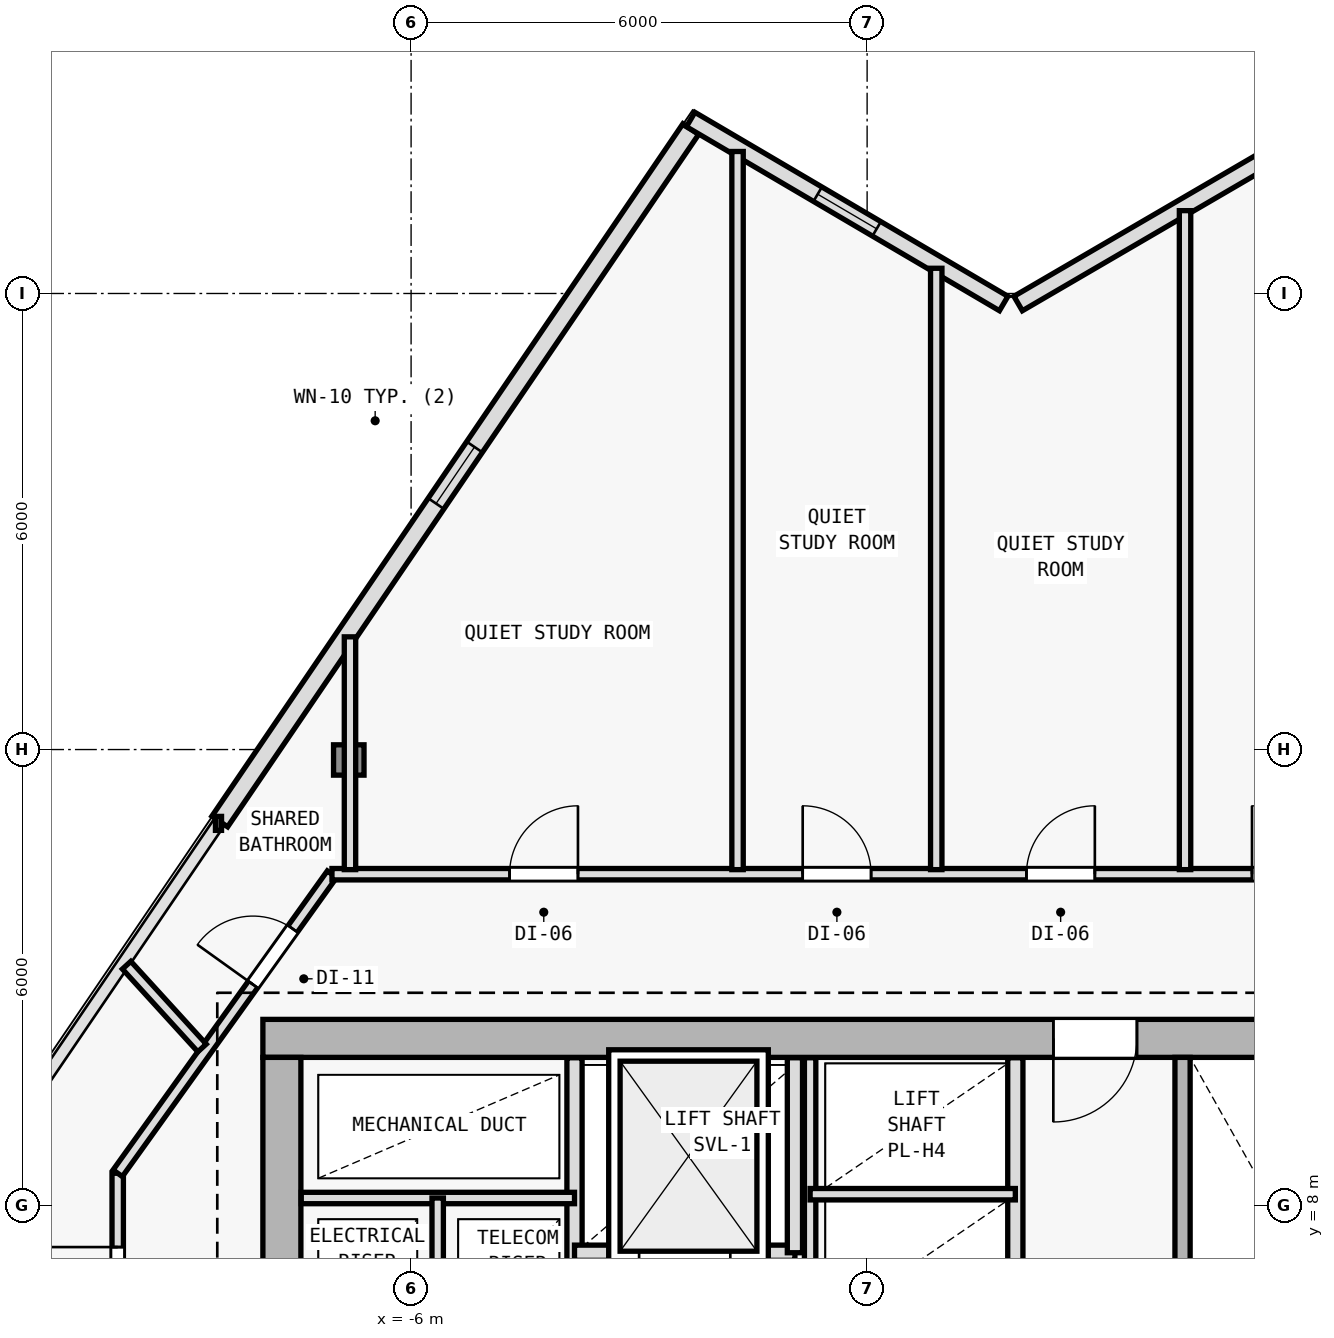
"""IFC4 building model, lengths in metres.
Left out: names, types, materials, properties, quantities, classifications, styles, units other than length and angle.
Written with IfcOpenShell. Run it as: python <this file> out.ifc"""

import sys

from ifc_helpers import new_model, si_unit, direction, frame, frame_2d, origin, origin_2d, place, context, subcontext, project, spatial, rectangle, i_section, extrude, element, fill, save


model = new_model("IFC4")
c1 = context("Model", 3, precision=1e-05, world=origin(), true_north=direction((0.0, 1.0)))
c2 = subcontext(c1, "Body", "Model", "MODEL_VIEW")
j1 = project(units=[si_unit("LENGTHUNIT", "METRE"), si_unit("PLANEANGLEUNIT", "RADIAN")], contexts=[c1])
p1 = place(None, origin())
s1 = spatial("IfcSite", under=j1, at=p1, CompositionType="ELEMENT")
p2 = place(p1, origin())
s2 = spatial("IfcBuilding", under=s1, at=p2, CompositionType="ELEMENT")
p3 = place(p2, frame((0.0, 0.0, 163.8)))
s3 = spatial("IfcBuildingStorey", under=s2, at=p3, CompositionType="ELEMENT", Elevation=163.8)
p4 = place(p3, frame((-7.7, 10.2, 0.0), z_axis=(0.0, 0.0, 1.0), x_axis=(1.0, 0.0, 0.0)))
e1 = element("IfcColumn", 1, at=p4, inside=s3, PredefinedType="COLUMN", context=c2, shape_type="SweptSolid", body=[
    extrude(i_section(OverallWidth=0.404, OverallDepth=0.407, WebThickness=0.017, FlangeThickness=0.028, FilletRadius=0.015, at=origin_2d()), origin(), (0.0, 0.0, 1.0), 3.6),
])
p5 = place(p3, frame((-6.82, 13.863, 0.005), z_axis=(0.008842562123, -0.00251672922, 0.999957736691), x_axis=(0.273743828055, 0.961802639112, 0.0)))
e2 = element("IfcColumn", 2, at=p5, inside=s3, PredefinedType="COLUMN", context=c2, shape_type="SweptSolid", body=[
    extrude(i_section(OverallWidth=0.401, OverallDepth=0.399, WebThickness=0.016, FlangeThickness=0.025, FilletRadius=0.015, at=origin_2d()), origin(), (0.0, 0.0, 1.0), 3.589),
])
p6 = place(p3, frame((-8.517, 13.053, 0.0), z_axis=(0.0, 0.0, 1.0), x_axis=(0.562463961516, 0.826821801838, 0.0)))
e3 = element("IfcWall", 3, at=p6, inside=s3, PredefinedType="SOLIDWALL", context=c2, shape_type="SweptSolid", body=[
    extrude(rectangle(XDim=11.018, YDim=0.25, at=frame_2d((5.509, 0.0))), origin(), (0.0, 0.0, 1.0), 3.35),
])
p7 = place(p6, frame((5.059, 0.0, 0.62)))
e4 = element("IfcOpeningElement", 4, at=p7, cuts=e3, PredefinedType="OPENING", context=c2, shape_type="SweptSolid", body=[
    extrude(rectangle(XDim=0.9, YDim=1.6, at=frame_2d((0.45, 0.8))), frame((0.0, 0.135, 0.0), z_axis=(0.0, -1.0, 0.0), x_axis=(1.0, 0.0, 0.0)), (0.0, 0.0, 1.0), 0.27),
])
p8 = place(p3, frame((1.987, 19.868, 0.0), z_axis=(0.0, 0.0, 1.0), x_axis=(0.863979520686, 0.503526948469, 0.0)))
e5 = element("IfcWall", 5, at=p8, inside=s3, PredefinedType="SOLIDWALL", context=c2, shape_type="SweptSolid", body=[
    extrude(rectangle(XDim=4.324, YDim=0.22, at=frame_2d((2.162, 0.0))), origin(), (0.0, 0.0, 1.0), 3.35),
])
p9 = place(p3, frame((-2.322, 22.289, 0.0), z_axis=(0.0, 0.0, 1.0), x_axis=(0.862111523483, -0.506718581738, 0.0)))
e6 = element("IfcWall", 6, at=p9, inside=s3, PredefinedType="SOLIDWALL", context=c2, shape_type="SweptSolid", body=[
    extrude(rectangle(XDim=4.777, YDim=0.22, at=frame_2d((2.389, 0.0))), origin(), (0.0, 0.0, 1.0), 3.35),
])
p10 = place(p9, frame((1.939, 0.0, 0.62)))
e7 = element("IfcOpeningElement", 7, at=p10, cuts=e6, PredefinedType="OPENING", context=c2, shape_type="SweptSolid", body=[
    extrude(rectangle(XDim=0.9, YDim=1.6, at=frame_2d((0.45, 0.8))), frame((0.0, 0.12, 0.0), z_axis=(0.0, -1.0, 0.0), x_axis=(1.0, 0.0, 0.0)), (0.0, 0.0, 1.0), 0.24),
])
p11 = place(p3, frame((7.95, 10.2, 0.0), z_axis=(0.0, 0.0, 1.0), x_axis=(-1.0, 0.0, 0.0)))
e8 = element("IfcWall", 8, at=p11, inside=s3, PredefinedType="SHEAR", context=c2, shape_type="SweptSolid", body=[
    extrude(rectangle(XDim=15.9, YDim=0.5, at=frame_2d((7.95, 0.0))), origin(), (0.0, 0.0, 1.0), 3.35),
])
p12 = place(p11, frame((4.4, 0.0, 0.0)))
e9 = element("IfcOpeningElement", 9, at=p12, cuts=e8, PredefinedType="OPENING", context=c2, shape_type="SweptSolid", body=[
    extrude(rectangle(XDim=1.1, YDim=2.15, at=frame_2d((0.55, 1.075))), frame((0.0, 0.26, 0.0), z_axis=(0.0, -1.0, 0.0), x_axis=(1.0, 0.0, 0.0)), (0.0, 0.0, 1.0), 0.52),
])
p13 = place(p3, frame((-7.7, -9.15, 0.0), z_axis=(0.0, 0.0, 1.0), x_axis=(0.0, 1.0, 0.0)))
e10 = element("IfcWall", 10, at=p13, inside=s3, PredefinedType="SHEAR", context=c2, shape_type="SweptSolid", body=[
    extrude(rectangle(XDim=19.1, YDim=0.5, at=frame_2d((9.55, 0.0))), origin(), (0.0, 0.0, 1.0), 3.35),
])
p14 = place(p13, frame((12.7, 0.0, 0.0)))
e11 = element("IfcOpeningElement", 11, at=p14, cuts=e10, PredefinedType="OPENING", context=c2, shape_type="SweptSolid", body=[
    extrude(rectangle(XDim=1.1, YDim=2.15, at=frame_2d((0.55, 1.075))), frame((0.0, 0.26, 0.0), z_axis=(0.0, -1.0, 0.0), x_axis=(1.0, 0.0, 0.0)), (0.0, 0.0, 1.0), 0.52),
])
p15 = place(p3, frame((-3.85, 1.35, 0.0), z_axis=(0.0, 0.0, 1.0), x_axis=(0.0, 1.0, 0.0)))
e12 = element("IfcWall", 12, at=p15, inside=s3, PredefinedType="SOLIDWALL", context=c2, shape_type="SweptSolid", body=[
    extrude(rectangle(XDim=8.595, YDim=0.2, at=frame_2d((4.297, 0.0))), origin(), (0.0, 0.0, 1.0), 3.35),
])
p16 = place(p15, frame((1.5, 0.0, 0.0)))
e13 = element("IfcOpeningElement", 13, at=p16, cuts=e12, PredefinedType="OPENING", context=c2, shape_type="SweptSolid", body=[
    extrude(rectangle(XDim=1.0, YDim=2.15, at=frame_2d((0.5, 1.075))), frame((0.0, 0.11, 0.0), z_axis=(0.0, -1.0, 0.0), x_axis=(1.0, 0.0, 0.0)), (0.0, 0.0, 1.0), 0.22),
])
p17 = place(p15, frame((3.18, 0.0, 0.0)))
e14 = element("IfcOpeningElement", 14, at=p17, cuts=e12, PredefinedType="OPENING", context=c2, shape_type="SweptSolid", body=[
    extrude(rectangle(XDim=1.0, YDim=2.15, at=frame_2d((0.5, 1.075))), frame((0.0, 0.11, 0.0), z_axis=(0.0, -1.0, 0.0), x_axis=(1.0, 0.0, 0.0)), (0.0, 0.0, 1.0), 0.22),
])
p18 = place(p3, frame((-7.445, 8.1, 0.0), z_axis=(0.0, 0.0, 1.0), x_axis=(1.0, 0.0, 0.0)))
e15 = element("IfcWall", 15, at=p18, inside=s3, PredefinedType="PARTITIONING", context=c2, shape_type="SweptSolid", body=[
    extrude(rectangle(XDim=3.595, YDim=0.15, at=frame_2d((1.797, 0.0))), origin(), (0.0, 0.0, 1.0), 3.35),
])
p19 = place(p3, frame((-5.65, 6.05, 0.0), z_axis=(0.0, 0.0, 1.0), x_axis=(0.0, 1.0, 0.0)))
e16 = element("IfcWall", 16, at=p19, inside=s3, PredefinedType="PARTITIONING", context=c2, shape_type="SweptSolid", body=[
    extrude(rectangle(XDim=2.05, YDim=0.15, at=frame_2d((1.025, 0.0))), origin(), (0.0, 0.0, 1.0), 3.35),
])
p20 = place(p3, frame((4.15, 2.75, 0.0), z_axis=(0.0, 0.0, 1.0), x_axis=(0.0, 1.0, 0.0)))
e17 = element("IfcWall", 17, at=p20, inside=s3, PredefinedType="SOLIDWALL", context=c2, shape_type="SweptSolid", body=[
    extrude(rectangle(XDim=7.2, YDim=0.2, at=frame_2d((3.6, 0.0))), origin(), (0.0, 0.0, 1.0), 3.35),
])
p21 = place(p20, frame((0.35, 0.0, 0.0)))
e18 = element("IfcOpeningElement", 18, at=p21, cuts=e17, PredefinedType="OPENING", context=c2, shape_type="SweptSolid", body=[
    extrude(rectangle(XDim=1.0, YDim=2.15, at=frame_2d((0.5, 1.075))), frame((0.0, 0.11, 0.0), z_axis=(0.0, -1.0, 0.0), x_axis=(1.0, 0.0, 0.0)), (0.0, 0.0, 1.0), 0.22),
])
p22 = place(p3, frame((-3.85, 7.38, 0.0), z_axis=(0.0, 0.0, 1.0), x_axis=(1.0, 0.0, 0.0)))
e19 = element("IfcWall", 19, at=p22, inside=s3, PredefinedType="SOLIDWALL", context=c2, shape_type="SweptSolid", body=[
    extrude(rectangle(XDim=2.9, YDim=0.2, at=frame_2d((1.45, 0.0))), origin(), (0.0, 0.0, 1.0), 3.35),
])
p23 = place(p22, frame((0.85, 0.0, 0.0)))
e20 = element("IfcOpeningElement", 20, at=p23, cuts=e19, PredefinedType="OPENING", context=c2, shape_type="SweptSolid", body=[
    extrude(rectangle(XDim=1.2, YDim=2.2, at=frame_2d((0.6, 1.1))), frame((0.0, 0.11, 0.0), z_axis=(0.0, -1.0, 0.0), x_axis=(1.0, 0.0, 0.0)), (0.0, 0.0, 1.0), 0.22),
])
p24 = place(p3, frame((-0.95, 7.38, 0.0), z_axis=(0.0, 0.0, 1.0), x_axis=(0.0, 1.0, 0.0)))
e21 = element("IfcWall", 21, at=p24, inside=s3, PredefinedType="SOLIDWALL", context=c2, shape_type="SweptSolid", body=[
    extrude(rectangle(XDim=2.565, YDim=0.2, at=frame_2d((1.283, 0.0))), origin(), (0.0, 0.0, 1.0), 3.35),
])
p25 = place(p3, frame((1.95, 2.65, 0.0), z_axis=(0.0, 0.0, 1.0), x_axis=(0.0, 1.0, 0.0)))
e22 = element("IfcWall", 22, at=p25, inside=s3, PredefinedType="SOLIDWALL", context=c2, shape_type="SweptSolid", body=[
    extrude(rectangle(XDim=7.295, YDim=0.2, at=frame_2d((3.647, 0.0))), origin(), (0.0, 0.0, 1.0), 3.35),
])
p26 = place(p3, frame((-0.75, 5.92, 0.0), z_axis=(0.0, 0.0, 1.0), x_axis=(0.0, 1.0, 0.0)))
e23 = element("IfcWall", 23, at=p26, inside=s3, PredefinedType="PARTITIONING", context=c2, shape_type="SweptSolid", body=[
    extrude(rectangle(XDim=4.025, YDim=0.15, at=frame_2d((2.013, 0.0))), origin(), (0.0, 0.0, 1.0), 3.35),
])
p27 = place(p3, frame((-0.75, 8.15, 0.0), z_axis=(0.0, 0.0, 1.0), x_axis=(1.0, 0.0, 0.0)))
e24 = element("IfcWall", 24, at=p27, inside=s3, PredefinedType="PARTITIONING", context=c2, shape_type="SweptSolid", body=[
    extrude(rectangle(XDim=2.7, YDim=0.15, at=frame_2d((1.35, 0.0))), origin(), (0.0, 0.0, 1.0), 3.35),
])
p28 = place(p3, frame((-9.86, -11.56, 0.0), z_axis=(0.0, 0.0, 1.0), x_axis=(0.0, 1.0, 0.0)))
e25 = element("IfcWall", 25, at=p28, inside=s3, PredefinedType="PARTITIONING", context=c2, shape_type="SweptSolid", body=[
    extrude(rectangle(XDim=19.986, YDim=0.15, at=frame_2d((9.993, 0.0))), origin(), (0.0, 0.0, 1.0), 2.725),
])
p29 = place(p28, frame((10.717, 0.0, 0.0)))
e26 = element("IfcOpeningElement", 26, at=p29, cuts=e25, PredefinedType="OPENING", context=c2, shape_type="SweptSolid", body=[
    extrude(rectangle(XDim=0.9, YDim=2.1, at=frame_2d((0.45, 1.05))), frame((0.0, 0.085, 0.0), z_axis=(0.0, -1.0, 0.0), x_axis=(1.0, 0.0, 0.0)), (0.0, 0.0, 1.0), 0.17),
])
p30 = place(p28, frame((8.333, 0.0, 0.0)))
e27 = element("IfcOpeningElement", 27, at=p30, cuts=e25, PredefinedType="OPENING", context=c2, shape_type="SweptSolid", body=[
    extrude(rectangle(XDim=0.9, YDim=2.1, at=frame_2d((0.45, 1.05))), frame((0.0, 0.085, 0.0), z_axis=(0.0, -1.0, 0.0), x_axis=(1.0, 0.0, 0.0)), (0.0, 0.0, 1.0), 0.17),
])
p31 = place(p28, frame((5.612, 0.0, 0.0)))
e28 = element("IfcOpeningElement", 28, at=p31, cuts=e25, PredefinedType="OPENING", context=c2, shape_type="SweptSolid", body=[
    extrude(rectangle(XDim=0.9, YDim=2.1, at=frame_2d((0.45, 1.05))), frame((0.0, 0.085, 0.0), z_axis=(0.0, -1.0, 0.0), x_axis=(1.0, 0.0, 0.0)), (0.0, 0.0, 1.0), 0.17),
])
p32 = place(p28, frame((1.932, 0.0, 0.0)))
e29 = element("IfcOpeningElement", 29, at=p32, cuts=e25, PredefinedType="OPENING", context=c2, shape_type="SweptSolid", body=[
    extrude(rectangle(XDim=0.9, YDim=2.1, at=frame_2d((0.45, 1.05))), frame((0.0, 0.085, 0.0), z_axis=(0.0, -1.0, 0.0), x_axis=(1.0, 0.0, 0.0)), (0.0, 0.0, 1.0), 0.17),
])
p33 = place(p28, frame((18.115, 0.0, 0.0)))
e30 = element("IfcOpeningElement", 30, at=p33, cuts=e25, PredefinedType="OPENING", context=c2, shape_type="SweptSolid", body=[
    extrude(rectangle(XDim=0.9, YDim=2.1, at=frame_2d((0.45, 1.05))), frame((0.0, 0.085, 0.0), z_axis=(0.0, -1.0, 0.0), x_axis=(1.0, 0.0, 0.0)), (0.0, 0.0, 1.0), 0.17),
])
p34 = place(p28, frame((15.711, 0.0, 0.0)))
e31 = element("IfcOpeningElement", 31, at=p34, cuts=e25, PredefinedType="OPENING", context=c2, shape_type="SweptSolid", body=[
    extrude(rectangle(XDim=0.9, YDim=2.1, at=frame_2d((0.45, 1.05))), frame((0.0, 0.085, 0.0), z_axis=(0.0, -1.0, 0.0), x_axis=(1.0, 0.0, 0.0)), (0.0, 0.0, 1.0), 0.17),
])
p35 = place(p28, frame((13.205, 0.0, 0.0)))
e32 = element("IfcOpeningElement", 32, at=p35, cuts=e25, PredefinedType="OPENING", context=c2, shape_type="SweptSolid", body=[
    extrude(rectangle(XDim=0.9, YDim=2.1, at=frame_2d((0.45, 1.05))), frame((0.0, 0.085, 0.0), z_axis=(0.0, -1.0, 0.0), x_axis=(1.0, 0.0, 0.0)), (0.0, 0.0, 1.0), 0.17),
])
p36 = place(p3, frame((-9.86, 8.426, 0.0), z_axis=(0.0, 0.0, 1.0), x_axis=(0.582449511476, 0.812866881218, 0.0)))
e33 = element("IfcWall", 33, at=p36, inside=s3, PredefinedType="PARTITIONING", context=c2, shape_type="SweptSolid", body=[
    extrude(rectangle(XDim=4.84, YDim=0.15, at=frame_2d((2.42, 0.0))), origin(), (0.0, 0.0, 1.0), 2.965),
])
p37 = place(p36, frame((3.055, 0.0, 0.0)))
e34 = element("IfcOpeningElement", 34, at=p37, cuts=e33, PredefinedType="OPENING", context=c2, shape_type="SweptSolid", body=[
    extrude(rectangle(XDim=0.9, YDim=2.1, at=frame_2d((0.45, 1.05))), frame((0.0, 0.085, 0.0), z_axis=(0.0, -1.0, 0.0), x_axis=(1.0, 0.0, 0.0)), (0.0, 0.0, 1.0), 0.17),
])
p38 = place(p3, frame((-7.041, 12.36, 0.0), z_axis=(0.0, 0.0, 1.0), x_axis=(1.0, 0.0, 0.0)))
e35 = element("IfcWall", 35, at=p38, inside=s3, PredefinedType="PARTITIONING", context=c2, shape_type="SweptSolid", body=[
    extrude(rectangle(XDim=14.064, YDim=0.15, at=frame_2d((7.032, 0.0))), origin(), (0.0, 0.0, 1.0), 2.965),
])
p39 = place(p38, frame((12.105, 0.0, 0.0)))
e36 = element("IfcOpeningElement", 36, at=p39, cuts=e35, PredefinedType="OPENING", context=c2, shape_type="SweptSolid", body=[
    extrude(rectangle(XDim=0.9, YDim=2.1, at=frame_2d((0.45, 1.05))), frame((0.0, 0.085, 0.0), z_axis=(0.0, -1.0, 0.0), x_axis=(1.0, 0.0, 0.0)), (0.0, 0.0, 1.0), 0.17),
])
p40 = place(p38, frame((9.137, 0.0, 0.0)))
e37 = element("IfcOpeningElement", 37, at=p40, cuts=e35, PredefinedType="OPENING", context=c2, shape_type="SweptSolid", body=[
    extrude(rectangle(XDim=0.9, YDim=2.1, at=frame_2d((0.45, 1.05))), frame((0.0, 0.085, 0.0), z_axis=(0.0, -1.0, 0.0), x_axis=(1.0, 0.0, 0.0)), (0.0, 0.0, 1.0), 0.17),
])
p41 = place(p38, frame((6.193, 0.0, 0.0)))
e38 = element("IfcOpeningElement", 38, at=p41, cuts=e35, PredefinedType="OPENING", context=c2, shape_type="SweptSolid", body=[
    extrude(rectangle(XDim=0.9, YDim=2.1, at=frame_2d((0.45, 1.05))), frame((0.0, 0.085, 0.0), z_axis=(0.0, -1.0, 0.0), x_axis=(1.0, 0.0, 0.0)), (0.0, 0.0, 1.0), 0.17),
])
p42 = place(p38, frame((2.337, 0.0, 0.0)))
e39 = element("IfcOpeningElement", 39, at=p42, cuts=e35, PredefinedType="OPENING", context=c2, shape_type="SweptSolid", body=[
    extrude(rectangle(XDim=0.9, YDim=2.1, at=frame_2d((0.45, 1.05))), frame((0.0, 0.085, 0.0), z_axis=(0.0, -1.0, 0.0), x_axis=(1.0, 0.0, 0.0)), (0.0, 0.0, 1.0), 0.17),
])
p43 = place(p3, frame((-6.804, 12.42, 0.0), z_axis=(0.0, 0.0, 1.0), x_axis=(0.0, 1.0, 0.0)))
e40 = element("IfcWall", 40, at=p43, inside=s3, PredefinedType="PARTITIONING", context=c2, shape_type="SweptSolid", body=[
    extrude(rectangle(XDim=3.063, YDim=0.15, at=frame_2d((1.531, 0.0))), origin(), (0.0, 0.0, 1.0), 2.935),
])
p44 = place(p3, frame((0.909, 12.42, 0.0), z_axis=(0.0, 0.0, 1.0), x_axis=(0.0, 1.0, 0.0)))
e41 = element("IfcWall", 41, at=p44, inside=s3, PredefinedType="PARTITIONING", context=c2, shape_type="SweptSolid", body=[
    extrude(rectangle(XDim=7.912, YDim=0.15, at=frame_2d((3.956, 0.0))), origin(), (0.0, 0.0, 1.0), 2.935),
])
p45 = place(p3, frame((-8.75, 10.074, 0.0), z_axis=(0.0, 0.0, 1.0), x_axis=(-0.673703282985, 0.739001952971, 0.0)))
e42 = element("IfcWall", 42, at=p45, inside=s3, PredefinedType="PARTITIONING", context=c2, shape_type="SweptSolid", body=[
    extrude(rectangle(XDim=1.473, YDim=0.15, at=frame_2d((0.737, 0.0))), origin(), (0.0, 0.0, 1.0), 2.935),
])
p46 = place(p3, frame((4.183, 12.42, 0.0), z_axis=(0.0, 0.0, 1.0), x_axis=(0.0, 1.0, 0.0)))
e43 = element("IfcWall", 43, at=p46, inside=s3, PredefinedType="PARTITIONING", context=c2, shape_type="SweptSolid", body=[
    extrude(rectangle(XDim=8.67, YDim=0.15, at=frame_2d((4.335, 0.0))), origin(), (0.0, 0.0, 1.0), 2.935),
])
p47 = place(p3, frame((-1.705, 12.42, 0.0), z_axis=(0.0, 0.0, 1.0), x_axis=(0.0, 1.0, 0.0)))
e44 = element("IfcWall", 44, at=p47, inside=s3, PredefinedType="PARTITIONING", context=c2, shape_type="SweptSolid", body=[
    extrude(rectangle(XDim=9.448, YDim=0.15, at=frame_2d((4.724, 0.0))), origin(), (0.0, 0.0, 1.0), 2.935),
])
p48 = place(p7, origin())
e45 = element("IfcWindow", 45, at=p48, inside=s3, PartitioningType="SINGLE_PANEL", PredefinedType="WINDOW", context=c2, shape_type="SweptSolid", body=[
    extrude(rectangle(XDim=0.9, YDim=1.6, at=frame_2d((0.45, 0.8))), frame((0.0, 0.03, 0.0), z_axis=(0.0, -1.0, 0.0), x_axis=(1.0, 0.0, 0.0)), (0.0, 0.0, 1.0), 0.06),
])
fill(e4, e45)
p49 = place(p10, origin())
e46 = element("IfcWindow", 46, at=p49, inside=s3, PartitioningType="SINGLE_PANEL", PredefinedType="WINDOW", context=c2, shape_type="SweptSolid", body=[
    extrude(rectangle(XDim=0.9, YDim=1.6, at=frame_2d((0.45, 0.8))), frame((0.0, 0.03, 0.0), z_axis=(0.0, -1.0, 0.0), x_axis=(1.0, 0.0, 0.0)), (0.0, 0.0, 1.0), 0.06),
])
fill(e7, e46)
p50 = place(p12, origin())
e47 = element("IfcDoor", 47, at=p50, inside=s3, OperationType="SINGLE_SWING_RIGHT", PredefinedType="DOOR", context=c2, shape_type="SweptSolid", body=[
    extrude(rectangle(XDim=1.1, YDim=2.15, at=frame_2d((0.55, 1.075))), frame((0.0, 0.025, 0.0), z_axis=(0.0, -1.0, 0.0), x_axis=(1.0, 0.0, 0.0)), (0.0, 0.0, 1.0), 0.05),
])
fill(e9, e47)
p51 = place(p23, origin())
e48 = element("IfcDoor", 48, at=p51, inside=s3, OperationType="DOUBLE_DOOR_SLIDING", PredefinedType="DOOR", context=c2, shape_type="SweptSolid", body=[
    extrude(rectangle(XDim=1.2, YDim=2.2, at=frame_2d((0.6, 1.1))), frame((0.0, 0.025, 0.0), z_axis=(0.0, -1.0, 0.0), x_axis=(1.0, 0.0, 0.0)), (0.0, 0.0, 1.0), 0.05),
])
fill(e20, e48)
p52 = place(p39, origin())
e49 = element("IfcDoor", 49, at=p52, inside=s3, OperationType="SINGLE_SWING_LEFT", PredefinedType="DOOR", context=c2, shape_type="SweptSolid", body=[
    extrude(rectangle(XDim=0.9, YDim=2.1, at=frame_2d((0.45, 1.05))), frame((0.0, 0.025, 0.0), z_axis=(0.0, -1.0, 0.0), x_axis=(1.0, 0.0, 0.0)), (0.0, 0.0, 1.0), 0.05),
])
fill(e36, e49)
p53 = place(p40, origin())
e50 = element("IfcDoor", 50, at=p53, inside=s3, OperationType="SINGLE_SWING_RIGHT", PredefinedType="DOOR", context=c2, shape_type="SweptSolid", body=[
    extrude(rectangle(XDim=0.9, YDim=2.1, at=frame_2d((0.45, 1.05))), frame((0.0, 0.025, 0.0), z_axis=(0.0, -1.0, 0.0), x_axis=(1.0, 0.0, 0.0)), (0.0, 0.0, 1.0), 0.05),
])
fill(e37, e50)
p54 = place(p41, origin())
e51 = element("IfcDoor", 51, at=p54, inside=s3, OperationType="SINGLE_SWING_LEFT", PredefinedType="DOOR", context=c2, shape_type="SweptSolid", body=[
    extrude(rectangle(XDim=0.9, YDim=2.1, at=frame_2d((0.45, 1.05))), frame((0.0, 0.025, 0.0), z_axis=(0.0, -1.0, 0.0), x_axis=(1.0, 0.0, 0.0)), (0.0, 0.0, 1.0), 0.05),
])
fill(e38, e51)
p55 = place(p42, origin())
e52 = element("IfcDoor", 52, at=p55, inside=s3, OperationType="SINGLE_SWING_RIGHT", PredefinedType="DOOR", context=c2, shape_type="SweptSolid", body=[
    extrude(rectangle(XDim=0.9, YDim=2.1, at=frame_2d((0.45, 1.05))), frame((0.0, 0.025, 0.0), z_axis=(0.0, -1.0, 0.0), x_axis=(1.0, 0.0, 0.0)), (0.0, 0.0, 1.0), 0.05),
])
fill(e39, e52)
p56 = place(p37, origin())
e53 = element("IfcDoor", 53, at=p56, inside=s3, OperationType="SINGLE_SWING_LEFT", PredefinedType="DOOR", context=c2, shape_type="SweptSolid", body=[
    extrude(rectangle(XDim=0.9, YDim=2.1, at=frame_2d((0.45, 1.05))), frame((0.0, 0.025, 0.0), z_axis=(0.0, -1.0, 0.0), x_axis=(1.0, 0.0, 0.0)), (0.0, 0.0, 1.0), 0.05),
])
fill(e34, e53)
p57 = place(p33, origin())
e54 = element("IfcDoor", 54, at=p57, inside=s3, OperationType="SINGLE_SWING_RIGHT", PredefinedType="DOOR", context=c2, shape_type="SweptSolid", body=[
    extrude(rectangle(XDim=0.9, YDim=2.1, at=frame_2d((0.45, 1.05))), frame((0.0, 0.025, 0.0), z_axis=(0.0, -1.0, 0.0), x_axis=(1.0, 0.0, 0.0)), (0.0, 0.0, 1.0), 0.05),
])
fill(e30, e54)
save(model, sys.argv[1])
